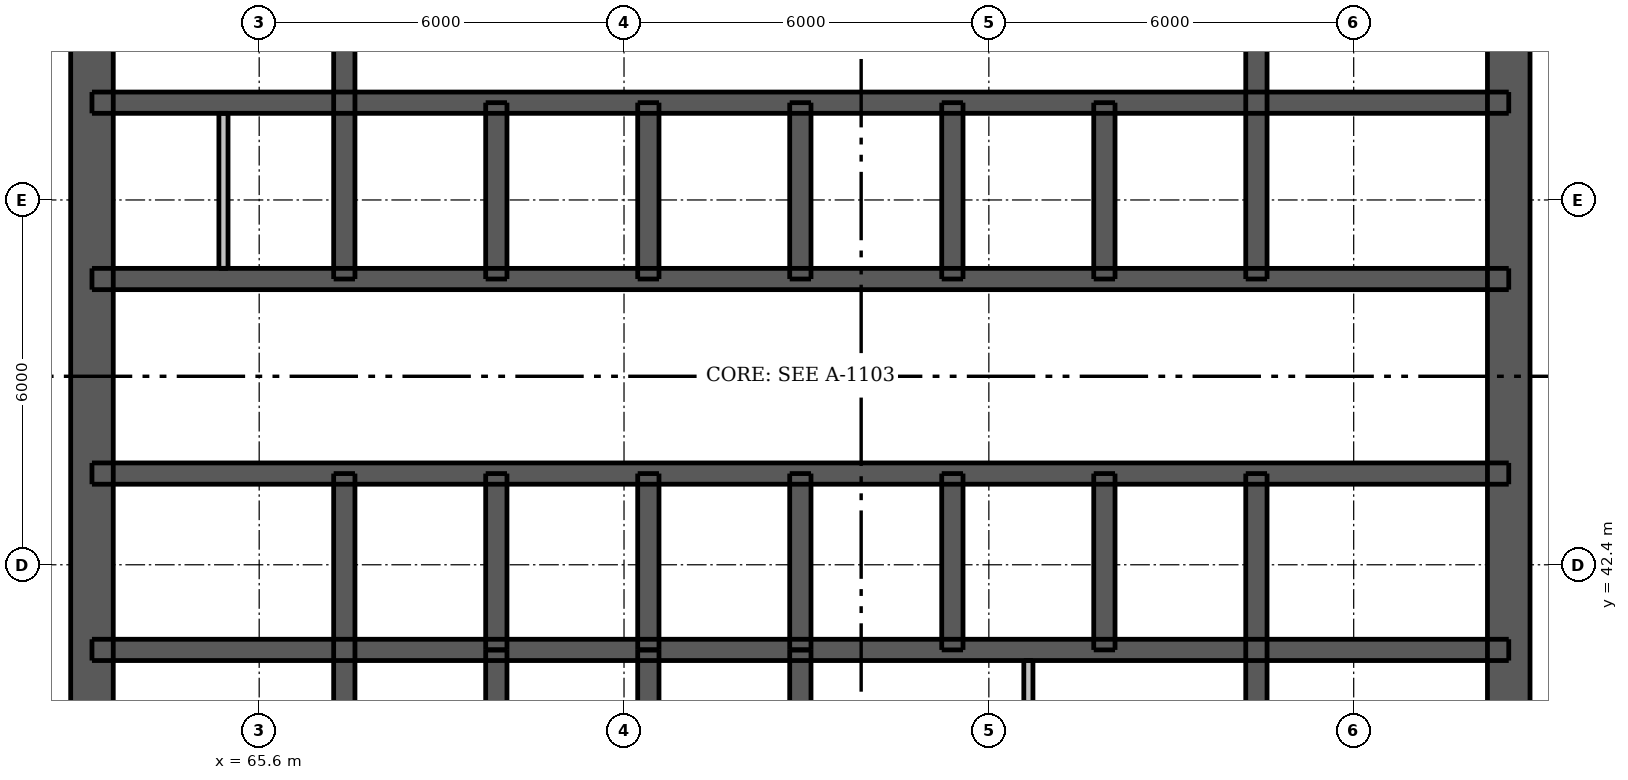
"""IFC4 building model, lengths in metres.
Left out: names, types, materials, properties, quantities, classifications, styles, units other than length and angle.
Written with IfcOpenShell. Run it as: python <this file> out.ifc"""

import sys

from ifc_helpers import new_model, si_unit, direction, frame, frame_2d, origin, place, context, subcontext, project, spatial, rectangle, extrude, element, fill, save


model = new_model("IFC4")
c1 = context("Model", 3, precision=1e-05, world=origin(), true_north=direction((0.0, 1.0)))
c2 = subcontext(c1, "Body", "Model", "MODEL_VIEW")
j1 = project(units=[si_unit("LENGTHUNIT", "METRE"), si_unit("PLANEANGLEUNIT", "RADIAN")], contexts=[c1])
p1 = place(None, origin())
s1 = spatial("IfcSite", under=j1, at=p1, CompositionType="ELEMENT")
p2 = place(p1, origin())
s2 = spatial("IfcBuilding", under=s1, at=p2, CompositionType="ELEMENT")
p3 = place(p2, frame((0.0, 0.0, 161.5)))
s3 = spatial("IfcBuildingStorey", under=s2, at=p3, CompositionType="ELEMENT", Elevation=161.5)
p4 = place(p3, frame((62.85, 33.5, 0.0), z_axis=(0.0, 0.0, 1.0), x_axis=(0.0, 1.0, 0.0)))
e1 = element("IfcWall", 1, at=p4, inside=s3, PredefinedType="SHEAR", context=c2, shape_type="SweptSolid", body=[
    extrude(rectangle(XDim=24.0, YDim=0.7, at=frame_2d((12.0, 0.0))), origin(), (0.0, 0.0, 1.0), 3.05),
])
p5 = place(p4, frame((11.2, 0.0, 0.0)))
e2 = element("IfcOpeningElement", 2, at=p5, cuts=e1, PredefinedType="OPENING", context=c2, shape_type="SweptSolid", body=[
    extrude(rectangle(XDim=1.6, YDim=2.1, at=frame_2d((0.8, 1.05))), frame((0.0, 0.36, 0.0), z_axis=(0.0, -1.0, 0.0), x_axis=(1.0, 0.0, 0.0)), (0.0, 0.0, 1.0), 0.72),
])
p6 = place(p3, frame((86.15, 33.5, 0.0), z_axis=(0.0, 0.0, 1.0), x_axis=(0.0, 1.0, 0.0)))
e3 = element("IfcWall", 3, at=p6, inside=s3, PredefinedType="SHEAR", context=c2, shape_type="SweptSolid", body=[
    extrude(rectangle(XDim=24.0, YDim=0.7, at=frame_2d((12.0, 0.0))), origin(), (0.0, 0.0, 1.0), 3.05),
])
p7 = place(p6, frame((11.2, 0.0, 0.0)))
e4 = element("IfcOpeningElement", 4, at=p7, cuts=e3, PredefinedType="OPENING", context=c2, shape_type="SweptSolid", body=[
    extrude(rectangle(XDim=1.6, YDim=2.1, at=frame_2d((0.8, 1.05))), frame((0.0, 0.36, 0.0), z_axis=(0.0, -1.0, 0.0), x_axis=(1.0, 0.0, 0.0)), (0.0, 0.0, 1.0), 0.72),
])
p8 = place(p3, frame((62.85, 41.0, 0.0), z_axis=(0.0, 0.0, 1.0), x_axis=(1.0, 0.0, 0.0)))
e5 = element("IfcWall", 5, at=p8, inside=s3, PredefinedType="SHEAR", context=c2, shape_type="SweptSolid", body=[
    extrude(rectangle(XDim=23.3, YDim=0.35, at=frame_2d((11.65, 0.0))), origin(), (0.0, 0.0, 1.0), 3.05),
])
p9 = place(p3, frame((62.85, 43.9, 0.0), z_axis=(0.0, 0.0, 1.0), x_axis=(1.0, 0.0, 0.0)))
e6 = element("IfcWall", 6, at=p9, inside=s3, PredefinedType="SHEAR", context=c2, shape_type="SweptSolid", body=[
    extrude(rectangle(XDim=23.3, YDim=0.35, at=frame_2d((11.65, 0.0))), origin(), (0.0, 0.0, 1.0), 3.05),
])
p10 = place(p9, frame((1.712, 0.0, 0.0)))
e7 = element("IfcOpeningElement", 7, at=p10, cuts=e6, PredefinedType="OPENING", context=c2, shape_type="SweptSolid", body=[
    extrude(rectangle(XDim=0.9, YDim=2.1, at=frame_2d((0.45, 1.05))), frame((0.0, 0.185, 0.0), z_axis=(0.0, -1.0, 0.0), x_axis=(1.0, 0.0, 0.0)), (0.0, 0.0, 1.0), 0.37),
])
p11 = place(p9, frame((20.688, 0.0, 0.0)))
e8 = element("IfcOpeningElement", 8, at=p11, cuts=e6, PredefinedType="OPENING", context=c2, shape_type="SweptSolid", body=[
    extrude(rectangle(XDim=0.9, YDim=2.1, at=frame_2d((0.45, 1.05))), frame((0.0, 0.185, 0.0), z_axis=(0.0, -1.0, 0.0), x_axis=(1.0, 0.0, 0.0)), (0.0, 0.0, 1.0), 0.37),
])
p12 = place(p9, frame((4.95, 0.0, 0.0)))
e9 = element("IfcOpeningElement", 9, at=p12, cuts=e6, PredefinedType="OPENING", context=c2, shape_type="SweptSolid", body=[
    extrude(rectangle(XDim=0.9, YDim=2.1, at=frame_2d((0.45, 1.05))), frame((0.0, 0.185, 0.0), z_axis=(0.0, -1.0, 0.0), x_axis=(1.0, 0.0, 0.0)), (0.0, 0.0, 1.0), 0.37),
])
p13 = place(p9, frame((9.95, 0.0, 0.0)))
e10 = element("IfcOpeningElement", 10, at=p13, cuts=e6, PredefinedType="OPENING", context=c2, shape_type="SweptSolid", body=[
    extrude(rectangle(XDim=0.9, YDim=2.1, at=frame_2d((0.45, 1.05))), frame((0.0, 0.185, 0.0), z_axis=(0.0, -1.0, 0.0), x_axis=(1.0, 0.0, 0.0)), (0.0, 0.0, 1.0), 0.37),
])
p14 = place(p9, frame((12.45, 0.0, 0.0)))
e11 = element("IfcOpeningElement", 11, at=p14, cuts=e6, PredefinedType="OPENING", context=c2, shape_type="SweptSolid", body=[
    extrude(rectangle(XDim=0.9, YDim=2.1, at=frame_2d((0.45, 1.05))), frame((0.0, 0.185, 0.0), z_axis=(0.0, -1.0, 0.0), x_axis=(1.0, 0.0, 0.0)), (0.0, 0.0, 1.0), 0.37),
])
p15 = place(p9, frame((17.45, 0.0, 0.0)))
e12 = element("IfcOpeningElement", 12, at=p15, cuts=e6, PredefinedType="OPENING", context=c2, shape_type="SweptSolid", body=[
    extrude(rectangle(XDim=0.9, YDim=2.1, at=frame_2d((0.45, 1.05))), frame((0.0, 0.185, 0.0), z_axis=(0.0, -1.0, 0.0), x_axis=(1.0, 0.0, 0.0)), (0.0, 0.0, 1.0), 0.37),
])
p16 = place(p3, frame((62.85, 47.1, 0.0), z_axis=(0.0, 0.0, 1.0), x_axis=(1.0, 0.0, 0.0)))
e13 = element("IfcWall", 13, at=p16, inside=s3, PredefinedType="SHEAR", context=c2, shape_type="SweptSolid", body=[
    extrude(rectangle(XDim=23.3, YDim=0.35, at=frame_2d((11.65, 0.0))), origin(), (0.0, 0.0, 1.0), 3.05),
])
p17 = place(p16, frame((0.806, 0.0, 0.0)))
e14 = element("IfcOpeningElement", 14, at=p17, cuts=e13, PredefinedType="OPENING", context=c2, shape_type="SweptSolid", body=[
    extrude(rectangle(XDim=0.9, YDim=2.1, at=frame_2d((0.45, 1.05))), frame((0.0, 0.185, 0.0), z_axis=(0.0, -1.0, 0.0), x_axis=(1.0, 0.0, 0.0)), (0.0, 0.0, 1.0), 0.37),
])
p18 = place(p16, frame((2.619, 0.0, 0.0)))
e15 = element("IfcOpeningElement", 15, at=p18, cuts=e13, PredefinedType="OPENING", context=c2, shape_type="SweptSolid", body=[
    extrude(rectangle(XDim=0.9, YDim=2.1, at=frame_2d((0.45, 1.05))), frame((0.0, 0.185, 0.0), z_axis=(0.0, -1.0, 0.0), x_axis=(1.0, 0.0, 0.0)), (0.0, 0.0, 1.0), 0.37),
])
p19 = place(p16, frame((20.688, 0.0, 0.0)))
e16 = element("IfcOpeningElement", 16, at=p19, cuts=e13, PredefinedType="OPENING", context=c2, shape_type="SweptSolid", body=[
    extrude(rectangle(XDim=0.9, YDim=2.1, at=frame_2d((0.45, 1.05))), frame((0.0, 0.185, 0.0), z_axis=(0.0, -1.0, 0.0), x_axis=(1.0, 0.0, 0.0)), (0.0, 0.0, 1.0), 0.37),
])
p20 = place(p16, frame((4.85, 0.0, 0.0)))
e17 = element("IfcOpeningElement", 17, at=p20, cuts=e13, PredefinedType="OPENING", context=c2, shape_type="SweptSolid", body=[
    extrude(rectangle(XDim=1.1, YDim=2.1, at=frame_2d((0.55, 1.05))), frame((0.0, 0.185, 0.0), z_axis=(0.0, -1.0, 0.0), x_axis=(1.0, 0.0, 0.0)), (0.0, 0.0, 1.0), 0.37),
])
p21 = place(p16, frame((7.35, 0.0, 0.0)))
e18 = element("IfcOpeningElement", 18, at=p21, cuts=e13, PredefinedType="OPENING", context=c2, shape_type="SweptSolid", body=[
    extrude(rectangle(XDim=1.1, YDim=2.1, at=frame_2d((0.55, 1.05))), frame((0.0, 0.185, 0.0), z_axis=(0.0, -1.0, 0.0), x_axis=(1.0, 0.0, 0.0)), (0.0, 0.0, 1.0), 0.37),
])
p22 = place(p16, frame((9.85, 0.0, 0.0)))
e19 = element("IfcOpeningElement", 19, at=p22, cuts=e13, PredefinedType="OPENING", context=c2, shape_type="SweptSolid", body=[
    extrude(rectangle(XDim=1.1, YDim=2.1, at=frame_2d((0.55, 1.05))), frame((0.0, 0.185, 0.0), z_axis=(0.0, -1.0, 0.0), x_axis=(1.0, 0.0, 0.0)), (0.0, 0.0, 1.0), 0.37),
])
p23 = place(p16, frame((12.35, 0.0, 0.0)))
e20 = element("IfcOpeningElement", 20, at=p23, cuts=e13, PredefinedType="OPENING", context=c2, shape_type="SweptSolid", body=[
    extrude(rectangle(XDim=1.1, YDim=2.1, at=frame_2d((0.55, 1.05))), frame((0.0, 0.185, 0.0), z_axis=(0.0, -1.0, 0.0), x_axis=(1.0, 0.0, 0.0)), (0.0, 0.0, 1.0), 0.37),
])
p24 = place(p16, frame((14.85, 0.0, 0.0)))
e21 = element("IfcOpeningElement", 21, at=p24, cuts=e13, PredefinedType="OPENING", context=c2, shape_type="SweptSolid", body=[
    extrude(rectangle(XDim=1.1, YDim=2.1, at=frame_2d((0.55, 1.05))), frame((0.0, 0.185, 0.0), z_axis=(0.0, -1.0, 0.0), x_axis=(1.0, 0.0, 0.0)), (0.0, 0.0, 1.0), 0.37),
])
p25 = place(p16, frame((17.35, 0.0, 0.0)))
e22 = element("IfcOpeningElement", 22, at=p25, cuts=e13, PredefinedType="OPENING", context=c2, shape_type="SweptSolid", body=[
    extrude(rectangle(XDim=1.1, YDim=2.1, at=frame_2d((0.55, 1.05))), frame((0.0, 0.185, 0.0), z_axis=(0.0, -1.0, 0.0), x_axis=(1.0, 0.0, 0.0)), (0.0, 0.0, 1.0), 0.37),
])
p26 = place(p3, frame((62.85, 50.0, 0.0), z_axis=(0.0, 0.0, 1.0), x_axis=(1.0, 0.0, 0.0)))
e23 = element("IfcWall", 23, at=p26, inside=s3, PredefinedType="SHEAR", context=c2, shape_type="SweptSolid", body=[
    extrude(rectangle(XDim=23.3, YDim=0.35, at=frame_2d((11.65, 0.0))), origin(), (0.0, 0.0, 1.0), 3.05),
])
p27 = place(p3, frame((67.0, 33.85, 0.0), z_axis=(0.0, 0.0, 1.0), x_axis=(0.0, 1.0, 0.0)))
e24 = element("IfcWall", 24, at=p27, inside=s3, PredefinedType="SHEAR", context=c2, shape_type="SweptSolid", body=[
    extrude(rectangle(XDim=10.05, YDim=0.35, at=frame_2d((5.025, 0.0))), origin(), (0.0, 0.0, 1.0), 3.05),
])
p28 = place(p27, frame((0.55, 0.0, 0.0)))
e25 = element("IfcOpeningElement", 25, at=p28, cuts=e24, PredefinedType="OPENING", context=c2, shape_type="SweptSolid", body=[
    extrude(rectangle(XDim=1.1, YDim=2.1, at=frame_2d((0.55, 1.05))), frame((0.0, 0.185, 0.0), z_axis=(0.0, -1.0, 0.0), x_axis=(1.0, 0.0, 0.0)), (0.0, 0.0, 1.0), 0.37),
])
for number, where, z_axis, x_axis in (
    (26, (67.0, 47.1, 0.0), (0.0, 0.0, 1.0), (0.0, 1.0, 0.0)),
    (27, (82.0, 33.85, 0.0), (0.0, 0.0, 1.0), (0.0, 1.0, 0.0)),
    (28, (82.0, 47.1, 0.0), (0.0, 0.0, 1.0), (0.0, 1.0, 0.0)),
):
    element("IfcWall", number, at=place(p3, frame(where, z_axis=z_axis, x_axis=x_axis)), inside=s3, PredefinedType="SHEAR", context=c2, shape_type="SweptSolid", body=[
        extrude(rectangle(XDim=10.05, YDim=0.35, at=frame_2d((5.025, 0.0))), origin(), (0.0, 0.0, 1.0), 3.05),
    ])
for number, where, z_axis, x_axis in (
    (29, (69.5, 41.0, 0.0), (0.0, 0.0, 1.0), (0.0, 1.0, 0.0)),
    (30, (69.5, 47.1, 0.0), (0.0, 0.0, 1.0), (0.0, 1.0, 0.0)),
    (31, (72.0, 41.0, 0.0), (0.0, 0.0, 1.0), (0.0, 1.0, 0.0)),
    (32, (72.0, 47.1, 0.0), (0.0, 0.0, 1.0), (0.0, 1.0, 0.0)),
    (33, (74.5, 41.0, 0.0), (0.0, 0.0, 1.0), (0.0, 1.0, 0.0)),
    (34, (74.5, 47.1, 0.0), (0.0, 0.0, 1.0), (0.0, 1.0, 0.0)),
    (35, (77.0, 41.0, 0.0), (0.0, 0.0, 1.0), (0.0, 1.0, 0.0)),
    (36, (77.0, 47.1, 0.0), (0.0, 0.0, 1.0), (0.0, 1.0, 0.0)),
    (37, (79.5, 41.0, 0.0), (0.0, 0.0, 1.0), (0.0, 1.0, 0.0)),
    (38, (79.5, 47.1, 0.0), (0.0, 0.0, 1.0), (0.0, 1.0, 0.0)),
    (39, (69.5, 38.1, 0.0), (0.0, 0.0, 1.0), (0.0, 1.0, 0.0)),
    (40, (72.0, 38.1, 0.0), (0.0, 0.0, 1.0), (0.0, 1.0, 0.0)),
    (41, (74.5, 38.1, 0.0), (0.0, 0.0, 1.0), (0.0, 1.0, 0.0)),
):
    element("IfcWall", number, at=place(p3, frame(where, z_axis=z_axis, x_axis=x_axis)), inside=s3, PredefinedType="SHEAR", context=c2, shape_type="SweptSolid", body=[
        extrude(rectangle(XDim=2.9, YDim=0.35, at=frame_2d((1.45, 0.0))), origin(), (0.0, 0.0, 1.0), 3.05),
    ])
p29 = place(p3, frame((78.25, 34.2, 0.0), z_axis=(0.0, 0.0, 1.0), x_axis=(0.0, 1.0, 0.0)))
e42 = element("IfcWall", 42, at=p29, inside=s3, PredefinedType="PLUMBINGWALL", context=c2, shape_type="SweptSolid", body=[
    extrude(rectangle(XDim=6.625, YDim=0.15, at=frame_2d((3.312, 0.0))), origin(), (0.0, 0.0, 1.0), 3.05),
])
p30 = place(p3, frame((65.012, 47.275, 0.0), z_axis=(0.0, 0.0, 1.0), x_axis=(0.0, 1.0, 0.0)))
e43 = element("IfcWall", 43, at=p30, inside=s3, PredefinedType="PLUMBINGWALL", context=c2, shape_type="SweptSolid", body=[
    extrude(rectangle(XDim=2.55, YDim=0.15, at=frame_2d((1.275, 0.0))), origin(), (0.0, 0.0, 1.0), 3.05),
])
p31 = place(p5, origin())
e44 = element("IfcDoor", 44, at=p31, inside=s3, OperationType="DOUBLE_DOOR_SINGLE_SWING", PredefinedType="DOOR", context=c2, shape_type="SweptSolid", body=[
    extrude(rectangle(XDim=1.6, YDim=2.1, at=frame_2d((0.8, 1.05))), frame((0.0, -0.288, 0.0), z_axis=(0.0, -1.0, 0.0), x_axis=(1.0, 0.0, 0.0)), (0.0, 0.0, 1.0), 0.05),
])
fill(e2, e44)
p32 = place(p7, origin())
e45 = element("IfcDoor", 45, at=p32, inside=s3, OperationType="DOUBLE_DOOR_SINGLE_SWING", PredefinedType="DOOR", context=c2, shape_type="SweptSolid", body=[
    extrude(rectangle(XDim=1.6, YDim=2.1, at=frame_2d((0.8, 1.05))), frame((0.0, 0.337, 0.0), z_axis=(0.0, -1.0, 0.0), x_axis=(1.0, 0.0, 0.0)), (0.0, 0.0, 1.0), 0.05),
])
fill(e4, e45)
p33 = place(p10, origin())
e46 = element("IfcDoor", 46, at=p33, inside=s3, OperationType="SINGLE_SWING_LEFT", PredefinedType="DOOR", context=c2, shape_type="SweptSolid", body=[
    extrude(rectangle(XDim=0.9, YDim=2.1, at=frame_2d((0.45, 1.05))), frame((0.0, -0.112, 0.0), z_axis=(0.0, -1.0, 0.0), x_axis=(1.0, 0.0, 0.0)), (0.0, 0.0, 1.0), 0.05),
])
fill(e7, e46)
p34 = place(p11, origin())
e47 = element("IfcDoor", 47, at=p34, inside=s3, OperationType="SINGLE_SWING_LEFT", PredefinedType="DOOR", context=c2, shape_type="SweptSolid", body=[
    extrude(rectangle(XDim=0.9, YDim=2.1, at=frame_2d((0.45, 1.05))), frame((0.0, -0.112, 0.0), z_axis=(0.0, -1.0, 0.0), x_axis=(1.0, 0.0, 0.0)), (0.0, 0.0, 1.0), 0.05),
])
fill(e8, e47)
p35 = place(p17, origin())
e48 = element("IfcDoor", 48, at=p35, inside=s3, OperationType="SINGLE_SWING_LEFT", PredefinedType="DOOR", context=c2, shape_type="SweptSolid", body=[
    extrude(rectangle(XDim=0.9, YDim=2.1, at=frame_2d((0.45, 1.05))), frame((0.0, 0.163, 0.0), z_axis=(0.0, -1.0, 0.0), x_axis=(1.0, 0.0, 0.0)), (0.0, 0.0, 1.0), 0.05),
])
fill(e14, e48)
p36 = place(p18, origin())
e49 = element("IfcDoor", 49, at=p36, inside=s3, OperationType="SINGLE_SWING_RIGHT", PredefinedType="DOOR", context=c2, shape_type="SweptSolid", body=[
    extrude(rectangle(XDim=0.9, YDim=2.1, at=frame_2d((0.45, 1.05))), frame((0.0, 0.163, 0.0), z_axis=(0.0, -1.0, 0.0), x_axis=(1.0, 0.0, 0.0)), (0.0, 0.0, 1.0), 0.05),
])
fill(e15, e49)
p37 = place(p19, origin())
e50 = element("IfcDoor", 50, at=p37, inside=s3, OperationType="SINGLE_SWING_LEFT", PredefinedType="DOOR", context=c2, shape_type="SweptSolid", body=[
    extrude(rectangle(XDim=0.9, YDim=2.1, at=frame_2d((0.45, 1.05))), frame((0.0, 0.163, 0.0), z_axis=(0.0, -1.0, 0.0), x_axis=(1.0, 0.0, 0.0)), (0.0, 0.0, 1.0), 0.05),
])
fill(e16, e50)
p38 = place(p12, origin())
e51 = element("IfcDoor", 51, at=p38, inside=s3, OperationType="SINGLE_SWING_RIGHT", PredefinedType="DOOR", context=c2, shape_type="SweptSolid", body=[
    extrude(rectangle(XDim=0.9, YDim=2.1, at=frame_2d((0.45, 1.05))), frame((0.0, -0.112, 0.0), z_axis=(0.0, -1.0, 0.0), x_axis=(1.0, 0.0, 0.0)), (0.0, 0.0, 1.0), 0.05),
])
fill(e9, e51)
p39 = place(p13, origin())
e52 = element("IfcDoor", 52, at=p39, inside=s3, OperationType="SINGLE_SWING_RIGHT", PredefinedType="DOOR", context=c2, shape_type="SweptSolid", body=[
    extrude(rectangle(XDim=0.9, YDim=2.1, at=frame_2d((0.45, 1.05))), frame((0.0, -0.112, 0.0), z_axis=(0.0, -1.0, 0.0), x_axis=(1.0, 0.0, 0.0)), (0.0, 0.0, 1.0), 0.05),
])
fill(e10, e52)
p40 = place(p14, origin())
e53 = element("IfcDoor", 53, at=p40, inside=s3, OperationType="SINGLE_SWING_LEFT", PredefinedType="DOOR", context=c2, shape_type="SweptSolid", body=[
    extrude(rectangle(XDim=0.9, YDim=2.1, at=frame_2d((0.45, 1.05))), frame((0.0, -0.112, 0.0), z_axis=(0.0, -1.0, 0.0), x_axis=(1.0, 0.0, 0.0)), (0.0, 0.0, 1.0), 0.05),
])
fill(e11, e53)
p41 = place(p15, origin())
e54 = element("IfcDoor", 54, at=p41, inside=s3, OperationType="SINGLE_SWING_LEFT", PredefinedType="DOOR", context=c2, shape_type="SweptSolid", body=[
    extrude(rectangle(XDim=0.9, YDim=2.1, at=frame_2d((0.45, 1.05))), frame((0.0, -0.112, 0.0), z_axis=(0.0, -1.0, 0.0), x_axis=(1.0, 0.0, 0.0)), (0.0, 0.0, 1.0), 0.05),
])
fill(e12, e54)
p42 = place(p20, origin())
e55 = element("IfcDoor", 55, at=p42, inside=s3, OperationType="DOUBLE_DOOR_SLIDING", PredefinedType="DOOR", context=c2, shape_type="SweptSolid", body=[
    extrude(rectangle(XDim=1.1, YDim=2.1, at=frame_2d((0.55, 1.05))), frame((0.0, 0.025, 0.0), z_axis=(0.0, -1.0, 0.0), x_axis=(1.0, 0.0, 0.0)), (0.0, 0.0, 1.0), 0.05),
])
fill(e17, e55)
p43 = place(p21, origin())
e56 = element("IfcDoor", 56, at=p43, inside=s3, OperationType="DOUBLE_DOOR_SLIDING", PredefinedType="DOOR", context=c2, shape_type="SweptSolid", body=[
    extrude(rectangle(XDim=1.1, YDim=2.1, at=frame_2d((0.55, 1.05))), frame((0.0, 0.025, 0.0), z_axis=(0.0, -1.0, 0.0), x_axis=(1.0, 0.0, 0.0)), (0.0, 0.0, 1.0), 0.05),
])
fill(e18, e56)
p44 = place(p22, origin())
e57 = element("IfcDoor", 57, at=p44, inside=s3, OperationType="DOUBLE_DOOR_SLIDING", PredefinedType="DOOR", context=c2, shape_type="SweptSolid", body=[
    extrude(rectangle(XDim=1.1, YDim=2.1, at=frame_2d((0.55, 1.05))), frame((0.0, 0.025, 0.0), z_axis=(0.0, -1.0, 0.0), x_axis=(1.0, 0.0, 0.0)), (0.0, 0.0, 1.0), 0.05),
])
fill(e19, e57)
p45 = place(p23, origin())
e58 = element("IfcDoor", 58, at=p45, inside=s3, OperationType="DOUBLE_DOOR_SLIDING", PredefinedType="DOOR", context=c2, shape_type="SweptSolid", body=[
    extrude(rectangle(XDim=1.1, YDim=2.1, at=frame_2d((0.55, 1.05))), frame((0.0, 0.025, 0.0), z_axis=(0.0, -1.0, 0.0), x_axis=(1.0, 0.0, 0.0)), (0.0, 0.0, 1.0), 0.05),
])
fill(e20, e58)
p46 = place(p24, origin())
e59 = element("IfcDoor", 59, at=p46, inside=s3, OperationType="DOUBLE_DOOR_SLIDING", PredefinedType="DOOR", context=c2, shape_type="SweptSolid", body=[
    extrude(rectangle(XDim=1.1, YDim=2.1, at=frame_2d((0.55, 1.05))), frame((0.0, 0.025, 0.0), z_axis=(0.0, -1.0, 0.0), x_axis=(1.0, 0.0, 0.0)), (0.0, 0.0, 1.0), 0.05),
])
fill(e21, e59)
p47 = place(p25, origin())
e60 = element("IfcDoor", 60, at=p47, inside=s3, OperationType="DOUBLE_DOOR_SLIDING", PredefinedType="DOOR", context=c2, shape_type="SweptSolid", body=[
    extrude(rectangle(XDim=1.1, YDim=2.1, at=frame_2d((0.55, 1.05))), frame((0.0, 0.025, 0.0), z_axis=(0.0, -1.0, 0.0), x_axis=(1.0, 0.0, 0.0)), (0.0, 0.0, 1.0), 0.05),
])
fill(e22, e60)
save(model, sys.argv[1])
